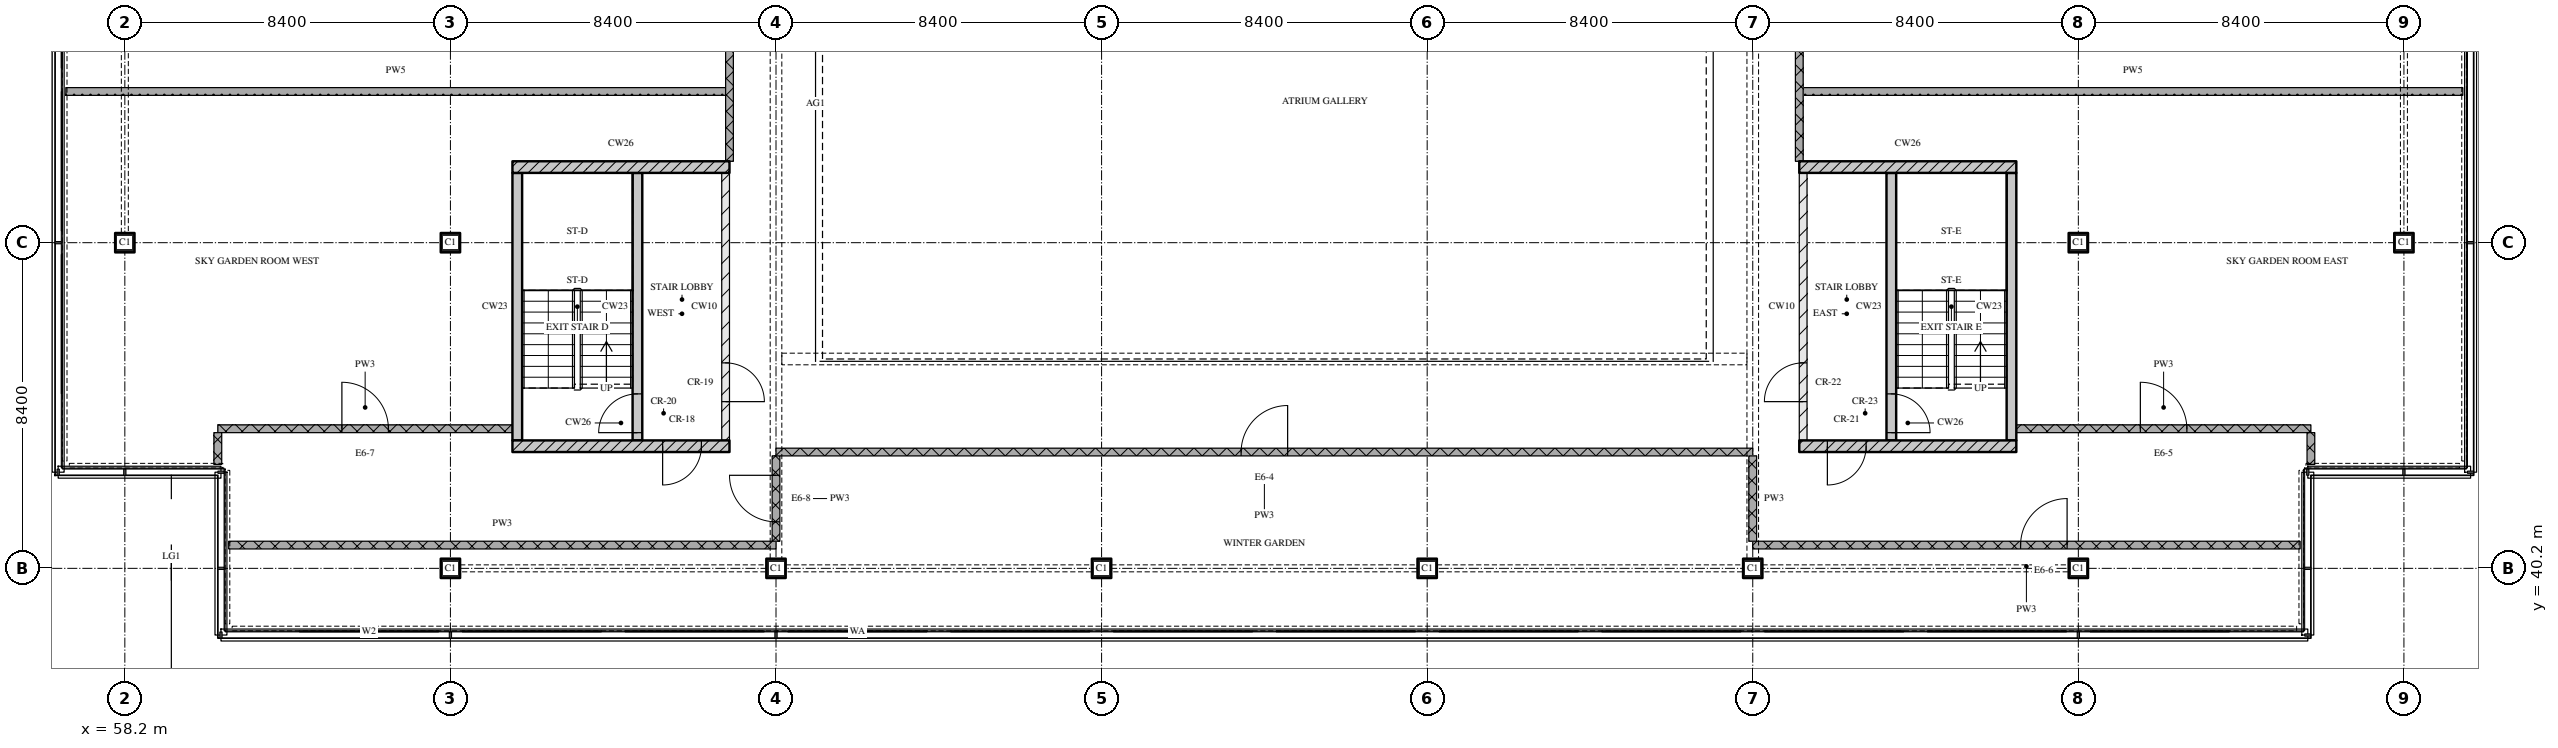
"""IFC4 building model, lengths in metres.
Left out: names, types, materials, properties, quantities, classifications, styles, units other than length and angle.
Written with IfcOpenShell. Run it as: python <this file> out.ifc"""

import sys

from ifc_helpers import new_model, si_unit, direction, frame, frame_2d, origin, origin_2d, place, context, subcontext, project, spatial, rectangle, extrude, element, fill, save


model = new_model("IFC4")
c1 = context("Model", 3, precision=1e-05, world=origin(), true_north=direction((0.0, 1.0)))
c2 = subcontext(c1, "Body", "Model", "MODEL_VIEW")
j1 = project(units=[si_unit("LENGTHUNIT", "METRE"), si_unit("PLANEANGLEUNIT", "RADIAN")], contexts=[c1])
p1 = place(None, origin())
s1 = spatial("IfcSite", under=j1, at=p1, CompositionType="ELEMENT")
p2 = place(p1, origin())
s2 = spatial("IfcBuilding", under=s1, at=p2, CompositionType="ELEMENT")
p3 = place(p2, frame((0.0, 0.0, 306.75)))
s3 = spatial("IfcBuildingStorey", under=s2, at=p3, CompositionType="ELEMENT", Elevation=306.75)
for number, where, z_axis, x_axis in (
    (1, (58.2, 48.6, 0.0), (0.0, 0.0, 1.0), (1.0, 0.0, 0.0)),
    (2, (66.6, 40.2, 0.0), (0.0, 0.0, 1.0), (1.0, 0.0, 0.0)),
    (3, (66.6, 48.6, 0.0), (0.0, 0.0, 1.0), (1.0, 0.0, 0.0)),
    (4, (75.0, 40.2, 0.0), (0.0, 0.0, 1.0), (1.0, 0.0, 0.0)),
    (5, (83.4, 40.2, 0.0), (0.0, 0.0, 1.0), (1.0, 0.0, 0.0)),
    (6, (91.8, 40.2, 0.0), (0.0, 0.0, 1.0), (1.0, 0.0, 0.0)),
    (7, (100.2, 40.2, 0.0), (0.0, 0.0, 1.0), (1.0, 0.0, 0.0)),
    (8, (108.6, 40.2, 0.0), (0.0, 0.0, 1.0), (1.0, 0.0, 0.0)),
    (9, (108.6, 48.6, 0.0), (0.0, 0.0, 1.0), (1.0, 0.0, 0.0)),
    (10, (117.0, 48.6, 0.0), (0.0, 0.0, 1.0), (1.0, 0.0, 0.0)),
):
    element("IfcColumn", number, at=place(p3, frame(where, z_axis=z_axis, x_axis=x_axis)), inside=s3, PredefinedType="COLUMN", context=c2, shape_type="SweptSolid", body=[
        extrude(rectangle(XDim=0.5, YDim=0.5, at=origin_2d()), origin(), (0.0, 0.0, 1.0), 3.6),
    ])
p4 = place(p3, frame((68.2, 43.35, 0.0), z_axis=(0.0, 0.0, 1.0), x_axis=(1.0, 0.0, 0.0)))
e11 = element("IfcWall", 11, at=p4, inside=s3, PredefinedType="SOLIDWALL", context=c2, shape_type="SweptSolid", body=[
    extrude(rectangle(XDim=5.6, YDim=0.3, at=frame_2d((2.8, 0.0))), origin(), (0.0, 0.0, 1.0), 3.3),
])
p5 = place(p4, frame((3.875, 0.0, 0.0)))
e12 = element("IfcOpeningElement", 12, at=p5, cuts=e11, PredefinedType="OPENING", context=c2, shape_type="SweptSolid", body=[
    extrude(rectangle(XDim=1.0, YDim=2.1, at=frame_2d((0.5, 1.05))), frame((0.0, 0.16, 0.0), z_axis=(0.0, -1.0, 0.0), x_axis=(1.0, 0.0, 0.0)), (0.0, 0.0, 1.0), 0.32),
])
p6 = place(p3, frame((68.325, 43.5, 0.0), z_axis=(0.0, 0.0, 1.0), x_axis=(0.0, 1.0, 0.0)))
e13 = element("IfcWall", 13, at=p6, inside=s3, PredefinedType="SOLIDWALL", context=c2, shape_type="SweptSolid", body=[
    extrude(rectangle(XDim=6.9, YDim=0.25, at=frame_2d((3.45, 0.0))), origin(), (0.0, 0.0, 1.0), 3.3),
])
p7 = place(p3, frame((71.425, 43.5, 0.0), z_axis=(0.0, 0.0, 1.0), x_axis=(0.0, 1.0, 0.0)))
e14 = element("IfcWall", 14, at=p7, inside=s3, PredefinedType="SOLIDWALL", context=c2, shape_type="SweptSolid", body=[
    extrude(rectangle(XDim=6.9, YDim=0.25, at=frame_2d((3.45, 0.0))), origin(), (0.0, 0.0, 1.0), 3.3),
])
p8 = place(p7, frame((0.2, 0.0, 0.0)))
e15 = element("IfcOpeningElement", 15, at=p8, cuts=e14, PredefinedType="OPENING", context=c2, shape_type="SweptSolid", body=[
    extrude(rectangle(XDim=1.0, YDim=2.1, at=frame_2d((0.5, 1.05))), frame((0.0, 0.135, 0.0), z_axis=(0.0, -1.0, 0.0), x_axis=(1.0, 0.0, 0.0)), (0.0, 0.0, 1.0), 0.27),
])
p9 = place(p3, frame((73.7, 43.5, 0.0), z_axis=(0.0, 0.0, 1.0), x_axis=(0.0, 1.0, 0.0)))
e16 = element("IfcWall", 16, at=p9, inside=s3, PredefinedType="PARTITIONING", context=c2, shape_type="SweptSolid", body=[
    extrude(rectangle(XDim=6.9, YDim=0.2, at=frame_2d((3.45, 0.0))), origin(), (0.0, 0.0, 1.0), 3.3),
])
p10 = place(p9, frame((1.0, 0.0, 0.0)))
e17 = element("IfcOpeningElement", 17, at=p10, cuts=e16, PredefinedType="OPENING", context=c2, shape_type="SweptSolid", body=[
    extrude(rectangle(XDim=1.0, YDim=2.1, at=frame_2d((0.5, 1.05))), frame((0.0, 0.11, 0.0), z_axis=(0.0, -1.0, 0.0), x_axis=(1.0, 0.0, 0.0)), (0.0, 0.0, 1.0), 0.22),
])
p11 = place(p3, frame((68.2, 50.55, 0.0), z_axis=(0.0, 0.0, 1.0), x_axis=(1.0, 0.0, 0.0)))
e18 = element("IfcWall", 18, at=p11, inside=s3, PredefinedType="SOLIDWALL", context=c2, shape_type="SweptSolid", body=[
    extrude(rectangle(XDim=5.6, YDim=0.3, at=frame_2d((2.8, 0.0))), origin(), (0.0, 0.0, 1.0), 3.3),
])
p12 = place(p3, frame((101.4, 43.35, 0.0), z_axis=(0.0, 0.0, 1.0), x_axis=(1.0, 0.0, 0.0)))
e19 = element("IfcWall", 19, at=p12, inside=s3, PredefinedType="SOLIDWALL", context=c2, shape_type="SweptSolid", body=[
    extrude(rectangle(XDim=5.6, YDim=0.3, at=frame_2d((2.8, 0.0))), origin(), (0.0, 0.0, 1.0), 3.3),
])
p13 = place(p12, frame((0.725, 0.0, 0.0)))
e20 = element("IfcOpeningElement", 20, at=p13, cuts=e19, PredefinedType="OPENING", context=c2, shape_type="SweptSolid", body=[
    extrude(rectangle(XDim=1.0, YDim=2.1, at=frame_2d((0.5, 1.05))), frame((0.0, 0.16, 0.0), z_axis=(0.0, -1.0, 0.0), x_axis=(1.0, 0.0, 0.0)), (0.0, 0.0, 1.0), 0.32),
])
p14 = place(p3, frame((101.5, 43.5, 0.0), z_axis=(0.0, 0.0, 1.0), x_axis=(0.0, 1.0, 0.0)))
e21 = element("IfcWall", 21, at=p14, inside=s3, PredefinedType="PARTITIONING", context=c2, shape_type="SweptSolid", body=[
    extrude(rectangle(XDim=6.9, YDim=0.2, at=frame_2d((3.45, 0.0))), origin(), (0.0, 0.0, 1.0), 3.3),
])
p15 = place(p14, frame((1.0, 0.0, 0.0)))
e22 = element("IfcOpeningElement", 22, at=p15, cuts=e21, PredefinedType="OPENING", context=c2, shape_type="SweptSolid", body=[
    extrude(rectangle(XDim=1.0, YDim=2.1, at=frame_2d((0.5, 1.05))), frame((0.0, 0.11, 0.0), z_axis=(0.0, -1.0, 0.0), x_axis=(1.0, 0.0, 0.0)), (0.0, 0.0, 1.0), 0.22),
])
p16 = place(p3, frame((103.775, 43.5, 0.0), z_axis=(0.0, 0.0, 1.0), x_axis=(0.0, 1.0, 0.0)))
e23 = element("IfcWall", 23, at=p16, inside=s3, PredefinedType="SOLIDWALL", context=c2, shape_type="SweptSolid", body=[
    extrude(rectangle(XDim=6.9, YDim=0.25, at=frame_2d((3.45, 0.0))), origin(), (0.0, 0.0, 1.0), 3.3),
])
p17 = place(p16, frame((0.2, 0.0, 0.0)))
e24 = element("IfcOpeningElement", 24, at=p17, cuts=e23, PredefinedType="OPENING", context=c2, shape_type="SweptSolid", body=[
    extrude(rectangle(XDim=1.0, YDim=2.1, at=frame_2d((0.5, 1.05))), frame((0.0, 0.135, 0.0), z_axis=(0.0, -1.0, 0.0), x_axis=(1.0, 0.0, 0.0)), (0.0, 0.0, 1.0), 0.27),
])
p18 = place(p3, frame((106.875, 43.5, 0.0), z_axis=(0.0, 0.0, 1.0), x_axis=(0.0, 1.0, 0.0)))
e25 = element("IfcWall", 25, at=p18, inside=s3, PredefinedType="SOLIDWALL", context=c2, shape_type="SweptSolid", body=[
    extrude(rectangle(XDim=6.9, YDim=0.25, at=frame_2d((3.45, 0.0))), origin(), (0.0, 0.0, 1.0), 3.3),
])
p19 = place(p3, frame((101.4, 50.55, 0.0), z_axis=(0.0, 0.0, 1.0), x_axis=(1.0, 0.0, 0.0)))
e26 = element("IfcWall", 26, at=p19, inside=s3, PredefinedType="SOLIDWALL", context=c2, shape_type="SweptSolid", body=[
    extrude(rectangle(XDim=5.6, YDim=0.3, at=frame_2d((2.8, 0.0))), origin(), (0.0, 0.0, 1.0), 3.3),
])
p20 = place(p3, frame((60.88, 40.8, 0.0), z_axis=(0.0, 0.0, 1.0), x_axis=(1.0, 0.0, 0.0)))
e27 = element("IfcWall", 27, at=p20, inside=s3, PredefinedType="PARTITIONING", context=c2, shape_type="SweptSolid", body=[
    extrude(rectangle(XDim=14.12, YDim=0.2, at=frame_2d((7.06, 0.0))), origin(), (0.0, 0.0, 1.0), 3.3),
])
p21 = place(p3, frame((114.32, 40.8, 0.0), z_axis=(0.0, 0.0, 1.0), x_axis=(-1.0, 0.0, 0.0)))
e28 = element("IfcWall", 28, at=p21, inside=s3, PredefinedType="PARTITIONING", context=c2, shape_type="SweptSolid", body=[
    extrude(rectangle(XDim=14.12, YDim=0.2, at=frame_2d((7.06, 0.0))), origin(), (0.0, 0.0, 1.0), 3.3),
])
p22 = place(p21, frame((6.01, 0.0, 0.0)))
e29 = element("IfcOpeningElement", 29, at=p22, cuts=e28, PredefinedType="OPENING", context=c2, shape_type="SweptSolid", body=[
    extrude(rectangle(XDim=1.2, YDim=2.1, at=frame_2d((0.6, 1.05))), frame((0.0, 0.11, 0.0), z_axis=(0.0, -1.0, 0.0), x_axis=(1.0, 0.0, 0.0)), (0.0, 0.0, 1.0), 0.22),
])
p23 = place(p3, frame((100.2, 43.2, 0.0), z_axis=(0.0, 0.0, 1.0), x_axis=(-1.0, 0.0, 0.0)))
e30 = element("IfcWall", 30, at=p23, inside=s3, PredefinedType="PARTITIONING", context=c2, shape_type="SweptSolid", body=[
    extrude(rectangle(XDim=25.2, YDim=0.2, at=frame_2d((12.6, 0.0))), origin(), (0.0, 0.0, 1.0), 3.3),
])
p24 = place(p23, frame((12.0, 0.0, 0.0)))
e31 = element("IfcOpeningElement", 31, at=p24, cuts=e30, PredefinedType="OPENING", context=c2, shape_type="SweptSolid", body=[
    extrude(rectangle(XDim=1.2, YDim=2.1, at=frame_2d((0.6, 1.05))), frame((0.0, 0.11, 0.0), z_axis=(0.0, -1.0, 0.0), x_axis=(1.0, 0.0, 0.0)), (0.0, 0.0, 1.0), 0.22),
])
p25 = place(p3, frame((60.6, 43.8, 0.0), z_axis=(0.0, 0.0, 1.0), x_axis=(1.0, 0.0, 0.0)))
e32 = element("IfcWall", 32, at=p25, inside=s3, PredefinedType="PARTITIONING", context=c2, shape_type="SweptSolid", body=[
    extrude(rectangle(XDim=7.6, YDim=0.2, at=frame_2d((3.8, 0.0))), origin(), (0.0, 0.0, 1.0), 3.3),
])
p26 = place(p25, frame((3.2, 0.0, 0.0)))
e33 = element("IfcOpeningElement", 33, at=p26, cuts=e32, PredefinedType="OPENING", context=c2, shape_type="SweptSolid", body=[
    extrude(rectangle(XDim=1.2, YDim=2.1, at=frame_2d((0.6, 1.05))), frame((0.0, 0.11, 0.0), z_axis=(0.0, -1.0, 0.0), x_axis=(1.0, 0.0, 0.0)), (0.0, 0.0, 1.0), 0.22),
])
p27 = place(p3, frame((107.0, 43.8, 0.0), z_axis=(0.0, 0.0, 1.0), x_axis=(1.0, 0.0, 0.0)))
e34 = element("IfcWall", 34, at=p27, inside=s3, PredefinedType="PARTITIONING", context=c2, shape_type="SweptSolid", body=[
    extrude(rectangle(XDim=7.6, YDim=0.2, at=frame_2d((3.8, 0.0))), origin(), (0.0, 0.0, 1.0), 3.3),
])
p28 = place(p27, frame((3.2, 0.0, 0.0)))
e35 = element("IfcOpeningElement", 35, at=p28, cuts=e34, PredefinedType="OPENING", context=c2, shape_type="SweptSolid", body=[
    extrude(rectangle(XDim=1.2, YDim=2.1, at=frame_2d((0.6, 1.05))), frame((0.0, 0.11, 0.0), z_axis=(0.0, -1.0, 0.0), x_axis=(1.0, 0.0, 0.0)), (0.0, 0.0, 1.0), 0.22),
])
for number, where, z_axis, x_axis in (
    (36, (56.68, 52.5, 0.0), (0.0, 0.0, 1.0), (1.0, 0.0, 0.0)),
    (37, (101.5, 52.5, 0.0), (0.0, 0.0, 1.0), (1.0, 0.0, 0.0)),
):
    element("IfcWall", number, at=place(p3, frame(where, z_axis=z_axis, x_axis=x_axis)), inside=s3, PredefinedType="PARTITIONING", context=c2, shape_type="SweptSolid", body=[
        extrude(rectangle(XDim=17.02, YDim=0.2, at=frame_2d((8.51, 0.0))), origin(), (0.0, 0.0, 1.0), 3.3),
    ])
p29 = place(p3, frame((60.6, 43.7, 0.0), z_axis=(0.0, 0.0, 1.0), x_axis=(0.0, -1.0, 0.0)))
e38 = element("IfcWall", 38, at=p29, inside=s3, PredefinedType="PARTITIONING", context=c2, shape_type="SweptSolid", body=[
    extrude(rectangle(XDim=0.82, YDim=0.2, at=frame_2d((0.41, 0.0))), origin(), (0.0, 0.0, 1.0), 3.3),
])
p30 = place(p3, frame((73.8, 50.7, 0.0), z_axis=(0.0, 0.0, 1.0), x_axis=(0.0, 1.0, 0.0)))
e39 = element("IfcWall", 39, at=p30, inside=s3, PredefinedType="PARTITIONING", context=c2, shape_type="SweptSolid", body=[
    extrude(rectangle(XDim=8.0, YDim=0.2, at=frame_2d((4.0, 0.0))), origin(), (0.0, 0.0, 1.0), 3.3),
])
p31 = place(p30, frame((4.35, 0.0, 0.0)))
e40 = element("IfcOpeningElement", 40, at=p31, cuts=e39, PredefinedType="OPENING", context=c2, shape_type="SweptSolid", body=[
    extrude(rectangle(XDim=1.2, YDim=2.1, at=frame_2d((0.6, 1.05))), frame((0.0, 0.11, 0.0), z_axis=(0.0, -1.0, 0.0), x_axis=(1.0, 0.0, 0.0)), (0.0, 0.0, 1.0), 0.22),
])
p32 = place(p3, frame((75.0, 43.1, 0.0), z_axis=(0.0, 0.0, 1.0), x_axis=(0.0, -1.0, 0.0)))
e41 = element("IfcWall", 41, at=p32, inside=s3, PredefinedType="PARTITIONING", context=c2, shape_type="SweptSolid", body=[
    extrude(rectangle(XDim=2.2, YDim=0.2, at=frame_2d((1.1, 0.0))), origin(), (0.0, 0.0, 1.0), 2.51),
])
p33 = place(p32, frame((0.5, 0.0, 0.0)))
e42 = element("IfcOpeningElement", 42, at=p33, cuts=e41, PredefinedType="OPENING", context=c2, shape_type="SweptSolid", body=[
    extrude(rectangle(XDim=1.2, YDim=2.1, at=frame_2d((0.6, 1.05))), frame((0.0, 0.11, 0.0), z_axis=(0.0, -1.0, 0.0), x_axis=(1.0, 0.0, 0.0)), (0.0, 0.0, 1.0), 0.22),
])
p34 = place(p3, frame((100.2, 43.1, 0.0), z_axis=(0.0, 0.0, 1.0), x_axis=(0.0, -1.0, 0.0)))
e43 = element("IfcWall", 43, at=p34, inside=s3, PredefinedType="PARTITIONING", context=c2, shape_type="SweptSolid", body=[
    extrude(rectangle(XDim=2.2, YDim=0.2, at=frame_2d((1.1, 0.0))), origin(), (0.0, 0.0, 1.0), 2.51),
])
p35 = place(p3, frame((101.4, 58.7, 0.0), z_axis=(0.0, 0.0, 1.0), x_axis=(0.0, -1.0, 0.0)))
e44 = element("IfcWall", 44, at=p35, inside=s3, PredefinedType="PARTITIONING", context=c2, shape_type="SweptSolid", body=[
    extrude(rectangle(XDim=8.0, YDim=0.2, at=frame_2d((4.0, 0.0))), origin(), (0.0, 0.0, 1.0), 3.3),
])
p36 = place(p35, frame((2.45, 0.0, 0.0)))
e45 = element("IfcOpeningElement", 45, at=p36, cuts=e44, PredefinedType="OPENING", context=c2, shape_type="SweptSolid", body=[
    extrude(rectangle(XDim=1.2, YDim=2.1, at=frame_2d((0.6, 1.05))), frame((0.0, 0.11, 0.0), z_axis=(0.0, -1.0, 0.0), x_axis=(1.0, 0.0, 0.0)), (0.0, 0.0, 1.0), 0.22),
])
p37 = place(p3, frame((114.6, 43.7, 0.0), z_axis=(0.0, 0.0, 1.0), x_axis=(0.0, -1.0, 0.0)))
e46 = element("IfcWall", 46, at=p37, inside=s3, PredefinedType="PARTITIONING", context=c2, shape_type="SweptSolid", body=[
    extrude(rectangle(XDim=0.82, YDim=0.2, at=frame_2d((0.41, 0.0))), origin(), (0.0, 0.0, 1.0), 3.3),
])
p38 = place(p5, origin())
e47 = element("IfcDoor", 47, at=p38, inside=s3, OperationType="SINGLE_SWING_RIGHT", PredefinedType="DOOR", context=c2, shape_type="SweptSolid", body=[
    extrude(rectangle(XDim=1.0, YDim=2.1, at=frame_2d((0.5, 1.05))), frame((0.0, 0.025, 0.0), z_axis=(0.0, -1.0, 0.0), x_axis=(1.0, 0.0, 0.0)), (0.0, 0.0, 1.0), 0.05),
])
fill(e12, e47)
p39 = place(p8, origin())
e48 = element("IfcDoor", 48, at=p39, inside=s3, OperationType="SINGLE_SWING_LEFT", PredefinedType="DOOR", context=c2, shape_type="SweptSolid", body=[
    extrude(rectangle(XDim=1.0, YDim=2.1, at=frame_2d((0.5, 1.05))), frame((0.0, 0.025, 0.0), z_axis=(0.0, -1.0, 0.0), x_axis=(1.0, 0.0, 0.0)), (0.0, 0.0, 1.0), 0.05),
])
fill(e15, e48)
p40 = place(p10, origin())
e49 = element("IfcDoor", 49, at=p40, inside=s3, OperationType="SINGLE_SWING_RIGHT", PredefinedType="DOOR", context=c2, shape_type="SweptSolid", body=[
    extrude(rectangle(XDim=1.0, YDim=2.1, at=frame_2d((0.5, 1.05))), frame((0.0, 0.025, 0.0), z_axis=(0.0, -1.0, 0.0), x_axis=(1.0, 0.0, 0.0)), (0.0, 0.0, 1.0), 0.05),
])
fill(e17, e49)
p41 = place(p13, origin())
e50 = element("IfcDoor", 50, at=p41, inside=s3, OperationType="SINGLE_SWING_RIGHT", PredefinedType="DOOR", context=c2, shape_type="SweptSolid", body=[
    extrude(rectangle(XDim=1.0, YDim=2.1, at=frame_2d((0.5, 1.05))), frame((0.0, 0.025, 0.0), z_axis=(0.0, -1.0, 0.0), x_axis=(1.0, 0.0, 0.0)), (0.0, 0.0, 1.0), 0.05),
])
fill(e20, e50)
p42 = place(p17, origin())
e51 = element("IfcDoor", 51, at=p42, inside=s3, OperationType="SINGLE_SWING_RIGHT", PredefinedType="DOOR", context=c2, shape_type="SweptSolid", body=[
    extrude(rectangle(XDim=1.0, YDim=2.1, at=frame_2d((0.5, 1.05))), frame((0.0, 0.025, 0.0), z_axis=(0.0, -1.0, 0.0), x_axis=(1.0, 0.0, 0.0)), (0.0, 0.0, 1.0), 0.05),
])
fill(e24, e51)
p43 = place(p15, origin())
e52 = element("IfcDoor", 52, at=p43, inside=s3, OperationType="SINGLE_SWING_LEFT", PredefinedType="DOOR", context=c2, shape_type="SweptSolid", body=[
    extrude(rectangle(XDim=1.0, YDim=2.1, at=frame_2d((0.5, 1.05))), frame((0.0, 0.025, 0.0), z_axis=(0.0, -1.0, 0.0), x_axis=(1.0, 0.0, 0.0)), (0.0, 0.0, 1.0), 0.05),
])
fill(e22, e52)
p44 = place(p22, origin())
e53 = element("IfcDoor", 53, at=p44, inside=s3, OperationType="SINGLE_SWING_RIGHT", PredefinedType="DOOR", context=c2, shape_type="SweptSolid", body=[
    extrude(rectangle(XDim=1.2, YDim=2.1, at=frame_2d((0.6, 1.05))), frame((0.0, 0.025, 0.0), z_axis=(0.0, -1.0, 0.0), x_axis=(1.0, 0.0, 0.0)), (0.0, 0.0, 1.0), 0.05),
])
fill(e29, e53)
p45 = place(p24, origin())
e54 = element("IfcDoor", 54, at=p45, inside=s3, OperationType="SINGLE_SWING_RIGHT", PredefinedType="DOOR", context=c2, shape_type="SweptSolid", body=[
    extrude(rectangle(XDim=1.2, YDim=2.1, at=frame_2d((0.6, 1.05))), frame((0.0, 0.025, 0.0), z_axis=(0.0, -1.0, 0.0), x_axis=(1.0, 0.0, 0.0)), (0.0, 0.0, 1.0), 0.05),
])
fill(e31, e54)
p46 = place(p26, origin())
e55 = element("IfcDoor", 55, at=p46, inside=s3, OperationType="SINGLE_SWING_LEFT", PredefinedType="DOOR", context=c2, shape_type="SweptSolid", body=[
    extrude(rectangle(XDim=1.2, YDim=2.1, at=frame_2d((0.6, 1.05))), frame((0.0, 0.025, 0.0), z_axis=(0.0, -1.0, 0.0), x_axis=(1.0, 0.0, 0.0)), (0.0, 0.0, 1.0), 0.05),
])
fill(e33, e55)
p47 = place(p28, origin())
e56 = element("IfcDoor", 56, at=p47, inside=s3, OperationType="SINGLE_SWING_LEFT", PredefinedType="DOOR", context=c2, shape_type="SweptSolid", body=[
    extrude(rectangle(XDim=1.2, YDim=2.1, at=frame_2d((0.6, 1.05))), frame((0.0, 0.025, 0.0), z_axis=(0.0, -1.0, 0.0), x_axis=(1.0, 0.0, 0.0)), (0.0, 0.0, 1.0), 0.05),
])
fill(e35, e56)
p48 = place(p33, origin())
e57 = element("IfcDoor", 57, at=p48, inside=s3, OperationType="SINGLE_SWING_RIGHT", PredefinedType="DOOR", context=c2, shape_type="SweptSolid", body=[
    extrude(rectangle(XDim=1.2, YDim=2.1, at=frame_2d((0.6, 1.05))), frame((0.0, 0.025, 0.0), z_axis=(0.0, -1.0, 0.0), x_axis=(1.0, 0.0, 0.0)), (0.0, 0.0, 1.0), 0.05),
])
fill(e42, e57)
save(model, sys.argv[1])
